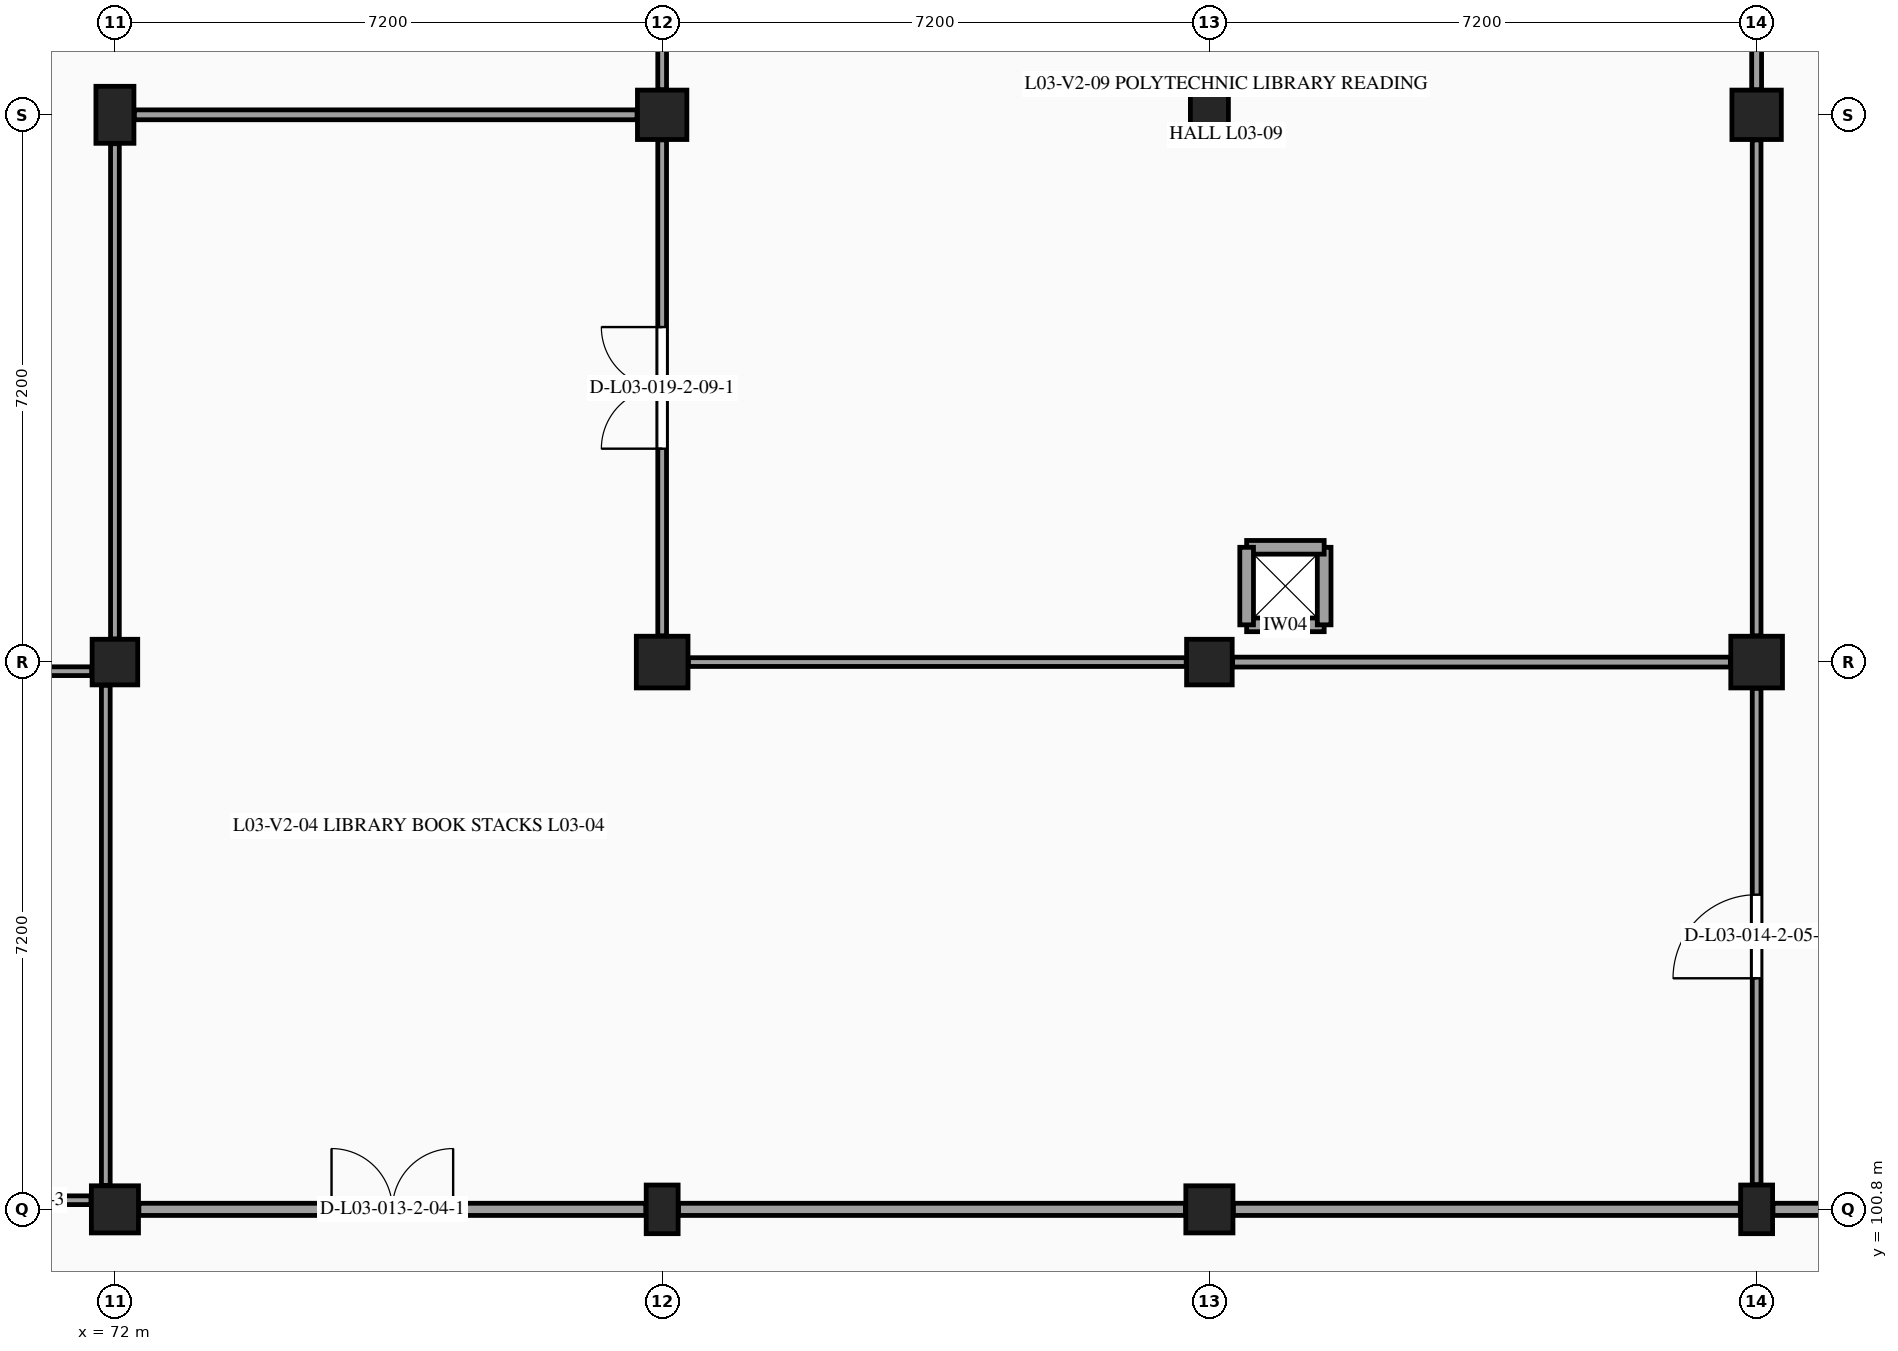
"""IFC4 building model, lengths in metres.
Left out: names, types, materials, properties, quantities, classifications, styles, units other than length and angle.
Written with IfcOpenShell. Run it as: python <this file> out.ifc"""

import sys

from ifc_helpers import new_model, si_unit, direction, frame, frame_2d, origin, origin_2d, place, context, subcontext, project, spatial, rectangle, extrude, element, fill, save


model = new_model("IFC4")
c1 = context("Model", 3, precision=1e-05, world=origin(), true_north=direction((0.0, 1.0)))
c2 = subcontext(c1, "Body", "Model", "MODEL_VIEW")
j1 = project(units=[si_unit("LENGTHUNIT", "METRE"), si_unit("PLANEANGLEUNIT", "RADIAN")], contexts=[c1])
p1 = place(None, origin())
s1 = spatial("IfcSite", under=j1, at=p1, CompositionType="ELEMENT")
p2 = place(p1, origin())
s2 = spatial("IfcBuilding", under=s1, at=p2, CompositionType="ELEMENT")
p3 = place(p2, frame((0.0, 0.0, 14.4)))
s3 = spatial("IfcBuildingStorey", under=s2, at=p3, CompositionType="ELEMENT", Elevation=14.4)
p4 = place(p3, frame((72.0, 100.8, 0.0), z_axis=(0.0, 0.0, 1.0), x_axis=(1.0, 0.0, 0.0)))
e1 = element("IfcColumn", 1, at=p4, inside=s3, PredefinedType="COLUMN", context=c2, shape_type="SweptSolid", body=[
    extrude(rectangle(XDim=0.62, YDim=0.62, at=origin_2d()), origin(), (0.0, 0.0, 1.0), 4.2),
])
p5 = place(p3, frame((72.0, 108.0, 0.0), z_axis=(0.0, 0.0, 1.0), x_axis=(1.0, 0.0, 0.0)))
e2 = element("IfcColumn", 2, at=p5, inside=s3, PredefinedType="COLUMN", context=c2, shape_type="SweptSolid", body=[
    extrude(rectangle(XDim=0.6, YDim=0.6, at=origin_2d()), origin(), (0.0, 0.0, 1.0), 4.2),
])
p6 = place(p3, frame((72.0, 115.2, 0.0), z_axis=(0.0, 0.0, 1.0), x_axis=(1.0, 0.0, 0.0)))
e3 = element("IfcColumn", 3, at=p6, inside=s3, PredefinedType="COLUMN", context=c2, shape_type="SweptSolid", body=[
    extrude(rectangle(XDim=0.5, YDim=0.75, at=origin_2d()), origin(), (0.0, 0.0, 1.0), 4.2),
])
p7 = place(p3, frame((79.2, 100.8, 0.0), z_axis=(0.0, 0.0, 1.0), x_axis=(1.0, 0.0, 0.0)))
e4 = element("IfcColumn", 4, at=p7, inside=s3, PredefinedType="PILASTER", context=c2, shape_type="SweptSolid", body=[
    extrude(rectangle(XDim=0.42, YDim=0.64, at=origin_2d()), origin(), (0.0, 0.0, 1.0), 4.2),
])
p8 = place(p3, frame((79.2, 108.0, 0.0), z_axis=(0.0, 0.0, 1.0), x_axis=(1.0, 0.0, 0.0)))
e5 = element("IfcColumn", 5, at=p8, inside=s3, PredefinedType="COLUMN", context=c2, shape_type="SweptSolid", body=[
    extrude(rectangle(XDim=0.68, YDim=0.68, at=origin_2d()), origin(), (0.0, 0.0, 1.0), 4.2),
])
p9 = place(p3, frame((79.2, 115.2, 0.0), z_axis=(0.0, 0.0, 1.0), x_axis=(1.0, 0.0, 0.0)))
e6 = element("IfcColumn", 6, at=p9, inside=s3, PredefinedType="COLUMN", context=c2, shape_type="SweptSolid", body=[
    extrude(rectangle(XDim=0.65, YDim=0.65, at=origin_2d()), origin(), (0.0, 0.0, 1.0), 4.2),
])
p10 = place(p3, frame((86.4, 100.8, 0.0), z_axis=(0.0, 0.0, 1.0), x_axis=(1.0, 0.0, 0.0)))
e7 = element("IfcColumn", 7, at=p10, inside=s3, PredefinedType="COLUMN", context=c2, shape_type="SweptSolid", body=[
    extrude(rectangle(XDim=0.62, YDim=0.62, at=origin_2d()), origin(), (0.0, 0.0, 1.0), 4.2),
])
p11 = place(p3, frame((86.4, 108.0, 0.0), z_axis=(0.0, 0.0, 1.0), x_axis=(1.0, 0.0, 0.0)))
e8 = element("IfcColumn", 8, at=p11, inside=s3, PredefinedType="COLUMN", context=c2, shape_type="SweptSolid", body=[
    extrude(rectangle(XDim=0.6, YDim=0.6, at=origin_2d()), origin(), (0.0, 0.0, 1.0), 4.2),
])
p12 = place(p3, frame((86.4, 115.2, 0.0), z_axis=(0.0, 0.0, 1.0), x_axis=(1.0, 0.0, 0.0)))
e9 = element("IfcColumn", 9, at=p12, inside=s3, PredefinedType="COLUMN", context=c2, shape_type="SweptSolid", body=[
    extrude(rectangle(XDim=0.5, YDim=0.75, at=origin_2d()), origin(), (0.0, 0.0, 1.0), 4.2),
])
p13 = place(p3, frame((93.6, 100.8, 0.0), z_axis=(0.0, 0.0, 1.0), x_axis=(1.0, 0.0, 0.0)))
e10 = element("IfcColumn", 10, at=p13, inside=s3, PredefinedType="PILASTER", context=c2, shape_type="SweptSolid", body=[
    extrude(rectangle(XDim=0.42, YDim=0.64, at=origin_2d()), origin(), (0.0, 0.0, 1.0), 4.2),
])
p14 = place(p3, frame((93.6, 108.0, 0.0), z_axis=(0.0, 0.0, 1.0), x_axis=(1.0, 0.0, 0.0)))
e11 = element("IfcColumn", 11, at=p14, inside=s3, PredefinedType="COLUMN", context=c2, shape_type="SweptSolid", body=[
    extrude(rectangle(XDim=0.68, YDim=0.68, at=origin_2d()), origin(), (0.0, 0.0, 1.0), 4.2),
])
p15 = place(p3, frame((93.6, 115.2, 0.0), z_axis=(0.0, 0.0, 1.0), x_axis=(1.0, 0.0, 0.0)))
e12 = element("IfcColumn", 12, at=p15, inside=s3, PredefinedType="COLUMN", context=c2, shape_type="SweptSolid", body=[
    extrude(rectangle(XDim=0.65, YDim=0.65, at=origin_2d()), origin(), (0.0, 0.0, 1.0), 4.2),
])
p16 = place(p3, frame((65.015, 100.92, 0.0), z_axis=(0.0, 0.0, 1.0), x_axis=(1.0, 0.0, 0.0)))
e13 = element("IfcWall", 13, at=p16, inside=s3, PredefinedType="PARTITIONING", context=c2, shape_type="SweptSolid", body=[
    extrude(rectangle(XDim=6.67, YDim=0.115, at=frame_2d((3.335, 0.0))), origin(), (0.0, 0.0, 1.0), 3.2),
])
p17 = place(p16, frame((0.785, 0.0, 0.0)))
e14 = element("IfcOpeningElement", 14, at=p17, cuts=e13, PredefinedType="OPENING", context=c2, shape_type="SweptSolid", body=[
    extrude(rectangle(XDim=0.95, YDim=2.1, at=frame_2d((0.475, 1.05))), frame((0.0, 0.067, 0.0), z_axis=(0.0, -1.0, 0.0), x_axis=(1.0, 0.0, 0.0)), (0.0, 0.0, 1.0), 0.135),
])
p18 = place(p16, frame((2.885, 0.0, 0.0)))
e15 = element("IfcOpeningElement", 15, at=p18, cuts=e13, PredefinedType="OPENING", context=c2, shape_type="SweptSolid", body=[
    extrude(rectangle(XDim=0.95, YDim=2.1, at=frame_2d((0.475, 1.05))), frame((0.0, 0.067, 0.0), z_axis=(0.0, -1.0, 0.0), x_axis=(1.0, 0.0, 0.0)), (0.0, 0.0, 1.0), 0.135),
])
p19 = place(p16, frame((5.035, 0.0, 0.0)))
e16 = element("IfcOpeningElement", 16, at=p19, cuts=e13, PredefinedType="OPENING", context=c2, shape_type="SweptSolid", body=[
    extrude(rectangle(XDim=1.0, YDim=2.15, at=frame_2d((0.5, 1.075))), frame((0.0, 0.067, 0.0), z_axis=(0.0, -1.0, 0.0), x_axis=(1.0, 0.0, 0.0)), (0.0, 0.0, 1.0), 0.135),
])
p20 = place(p3, frame((65.145, 107.88, 0.0), z_axis=(0.0, 0.0, 1.0), x_axis=(1.0, 0.0, 0.0)))
e17 = element("IfcWall", 17, at=p20, inside=s3, PredefinedType="PARTITIONING", context=c2, shape_type="SweptSolid", body=[
    extrude(rectangle(XDim=6.55, YDim=0.115, at=frame_2d((3.275, 0.0))), origin(), (0.0, 0.0, 1.0), 3.2),
])
p21 = place(p3, frame((71.88, 101.115, 0.0), z_axis=(0.0, 0.0, 1.0), x_axis=(0.0, 1.0, 0.0)))
e18 = element("IfcWall", 18, at=p21, inside=s3, PredefinedType="PARTITIONING", context=c2, shape_type="SweptSolid", body=[
    extrude(rectangle(XDim=6.58, YDim=0.115, at=frame_2d((3.29, 0.0))), origin(), (0.0, 0.0, 1.0), 3.25),
])
for number, where, z_axis, x_axis in (
    (19, (86.89, 108.49, 0.0), (0.0, 0.0, 1.0), (1.0, 0.0, 0.0)),
    (20, (87.91, 108.49, 0.0), (0.0, 0.0, 1.0), (0.0, 1.0, 0.0)),
    (21, (87.91, 109.51, 0.0), (0.0, 0.0, 1.0), (-1.0, 0.0, 0.0)),
    (22, (86.89, 109.51, 0.0), (0.0, 0.0, 1.0), (0.0, -1.0, 0.0)),
):
    element("IfcWall", number, at=place(p3, frame(where, z_axis=z_axis, x_axis=x_axis)), inside=s3, PredefinedType="PARTITIONING", context=c2, shape_type="SweptSolid", body=[
        extrude(rectangle(XDim=1.02, YDim=0.18, at=frame_2d((0.51, 0.0))), origin(), (0.0, 0.0, 1.0), 3.94),
    ])
p22 = place(p3, frame((72.0, 108.305, 0.0), z_axis=(0.0, 0.0, 1.0), x_axis=(0.0, 1.0, 0.0)))
e23 = element("IfcWall", 23, at=p22, inside=s3, PredefinedType="PARTITIONING", context=c2, shape_type="SweptSolid", body=[
    extrude(rectangle(XDim=6.515, YDim=0.115, at=frame_2d((3.258, 0.0))), origin(), (0.0, 0.0, 1.0), 3.245),
])
p23 = place(p3, frame((72.315, 100.8, 0.0), z_axis=(0.0, 0.0, 1.0), x_axis=(1.0, 0.0, 0.0)))
e24 = element("IfcWall", 24, at=p23, inside=s3, PredefinedType="PARTITIONING", context=c2, shape_type="SweptSolid", body=[
    extrude(rectangle(XDim=6.67, YDim=0.16, at=frame_2d((3.335, 0.0))), origin(), (0.0, 0.0, 1.0), 3.215),
])
p24 = place(p23, frame((2.535, 0.0, 0.0)))
e25 = element("IfcOpeningElement", 25, at=p24, cuts=e24, PredefinedType="OPENING", context=c2, shape_type="SweptSolid", body=[
    extrude(rectangle(XDim=1.6, YDim=2.2, at=frame_2d((0.8, 1.1))), frame((0.0, 0.09, 0.0), z_axis=(0.0, -1.0, 0.0), x_axis=(1.0, 0.0, 0.0)), (0.0, 0.0, 1.0), 0.18),
])
p25 = place(p3, frame((79.2, 108.345, 0.0), z_axis=(0.0, 0.0, 1.0), x_axis=(0.0, 1.0, 0.0)))
e26 = element("IfcWall", 26, at=p25, inside=s3, PredefinedType="PARTITIONING", context=c2, shape_type="SweptSolid", body=[
    extrude(rectangle(XDim=6.525, YDim=0.115, at=frame_2d((3.263, 0.0))), origin(), (0.0, 0.0, 1.0), 3.245),
])
p26 = place(p25, frame((2.462, 0.0, 0.0)))
e27 = element("IfcOpeningElement", 27, at=p26, cuts=e26, PredefinedType="OPENING", context=c2, shape_type="SweptSolid", body=[
    extrude(rectangle(XDim=1.6, YDim=2.2, at=frame_2d((0.8, 1.1))), frame((0.0, 0.067, 0.0), z_axis=(0.0, -1.0, 0.0), x_axis=(1.0, 0.0, 0.0)), (0.0, 0.0, 1.0), 0.135),
])
p27 = place(p3, frame((72.255, 115.2, 0.0), z_axis=(0.0, 0.0, 1.0), x_axis=(1.0, 0.0, 0.0)))
e28 = element("IfcWall", 28, at=p27, inside=s3, PredefinedType="PARTITIONING", context=c2, shape_type="SweptSolid", body=[
    extrude(rectangle(XDim=6.615, YDim=0.13, at=frame_2d((3.308, 0.0))), origin(), (0.0, 0.0, 1.0), 3.215),
])
p28 = place(p3, frame((79.2, 115.53, 0.0), z_axis=(0.0, 0.0, 1.0), x_axis=(0.0, 1.0, 0.0)))
e29 = element("IfcWall", 29, at=p28, inside=s3, PredefinedType="PARTITIONING", context=c2, shape_type="SweptSolid", body=[
    extrude(rectangle(XDim=6.555, YDim=0.115, at=frame_2d((3.277, 0.0))), origin(), (0.0, 0.0, 1.0), 3.245),
])
p29 = place(p3, frame((79.415, 100.8, 0.0), z_axis=(0.0, 0.0, 1.0), x_axis=(1.0, 0.0, 0.0)))
e30 = element("IfcWall", 30, at=p29, inside=s3, PredefinedType="PARTITIONING", context=c2, shape_type="SweptSolid", body=[
    extrude(rectangle(XDim=6.67, YDim=0.16, at=frame_2d((3.335, 0.0))), origin(), (0.0, 0.0, 1.0), 3.22),
])
p30 = place(p3, frame((79.545, 108.0, 0.0), z_axis=(0.0, 0.0, 1.0), x_axis=(1.0, 0.0, 0.0)))
e31 = element("IfcWall", 31, at=p30, inside=s3, PredefinedType="PARTITIONING", context=c2, shape_type="SweptSolid", body=[
    extrude(rectangle(XDim=6.55, YDim=0.115, at=frame_2d((3.275, 0.0))), origin(), (0.0, 0.0, 1.0), 3.22),
])
p31 = place(p3, frame((86.715, 100.8, 0.0), z_axis=(0.0, 0.0, 1.0), x_axis=(1.0, 0.0, 0.0)))
e32 = element("IfcWall", 32, at=p31, inside=s3, PredefinedType="PARTITIONING", context=c2, shape_type="SweptSolid", body=[
    extrude(rectangle(XDim=6.67, YDim=0.16, at=frame_2d((3.335, 0.0))), origin(), (0.0, 0.0, 1.0), 3.24),
])
p32 = place(p3, frame((93.6, 101.125, 0.0), z_axis=(0.0, 0.0, 1.0), x_axis=(0.0, 1.0, 0.0)))
e33 = element("IfcWall", 33, at=p32, inside=s3, PredefinedType="PARTITIONING", context=c2, shape_type="SweptSolid", body=[
    extrude(rectangle(XDim=6.53, YDim=0.115, at=frame_2d((3.265, 0.0))), origin(), (0.0, 0.0, 1.0), 3.225),
])
p33 = place(p32, frame((2.715, 0.0, 0.0)))
e34 = element("IfcOpeningElement", 34, at=p33, cuts=e33, PredefinedType="OPENING", context=c2, shape_type="SweptSolid", body=[
    extrude(rectangle(XDim=1.1, YDim=2.15, at=frame_2d((0.55, 1.075))), frame((0.0, 0.067, 0.0), z_axis=(0.0, -1.0, 0.0), x_axis=(1.0, 0.0, 0.0)), (0.0, 0.0, 1.0), 0.135),
])
p34 = place(p3, frame((86.705, 108.0, 0.0), z_axis=(0.0, 0.0, 1.0), x_axis=(1.0, 0.0, 0.0)))
e35 = element("IfcWall", 35, at=p34, inside=s3, PredefinedType="PARTITIONING", context=c2, shape_type="SweptSolid", body=[
    extrude(rectangle(XDim=6.55, YDim=0.13, at=frame_2d((3.275, 0.0))), origin(), (0.0, 0.0, 1.0), 3.24),
])
p35 = place(p3, frame((93.6, 108.345, 0.0), z_axis=(0.0, 0.0, 1.0), x_axis=(0.0, 1.0, 0.0)))
e36 = element("IfcWall", 36, at=p35, inside=s3, PredefinedType="PARTITIONING", context=c2, shape_type="SweptSolid", body=[
    extrude(rectangle(XDim=6.525, YDim=0.115, at=frame_2d((3.263, 0.0))), origin(), (0.0, 0.0, 1.0), 3.22),
])
p36 = place(p3, frame((93.6, 115.53, 0.0), z_axis=(0.0, 0.0, 1.0), x_axis=(0.0, 1.0, 0.0)))
e37 = element("IfcWall", 37, at=p36, inside=s3, PredefinedType="PARTITIONING", context=c2, shape_type="SweptSolid", body=[
    extrude(rectangle(XDim=6.555, YDim=0.13, at=frame_2d((3.277, 0.0))), origin(), (0.0, 0.0, 1.0), 3.22),
])
p37 = place(p3, frame((93.815, 100.8, 0.0), z_axis=(0.0, 0.0, 1.0), x_axis=(1.0, 0.0, 0.0)))
e38 = element("IfcWall", 38, at=p37, inside=s3, PredefinedType="PARTITIONING", context=c2, shape_type="SweptSolid", body=[
    extrude(rectangle(XDim=6.67, YDim=0.16, at=frame_2d((3.335, 0.0))), origin(), (0.0, 0.0, 1.0), 3.255),
])
p38 = place(p37, frame((2.375, 0.0, 0.0)))
e39 = element("IfcOpeningElement", 39, at=p38, cuts=e38, PredefinedType="OPENING", context=c2, shape_type="SweptSolid", body=[
    extrude(rectangle(XDim=1.92, YDim=2.35, at=frame_2d((0.96, 1.175))), frame((0.0, 0.09, 0.0), z_axis=(0.0, -1.0, 0.0), x_axis=(1.0, 0.0, 0.0)), (0.0, 0.0, 1.0), 0.18),
])
p39 = place(p24, origin())
e40 = element("IfcDoor", 40, at=p39, inside=s3, OperationType="DOUBLE_DOOR_SINGLE_SWING", PredefinedType="DOOR", context=c2, shape_type="SweptSolid", body=[
    extrude(rectangle(XDim=1.6, YDim=2.2, at=frame_2d((0.8, 1.1))), frame((0.0, 0.025, 0.0), z_axis=(0.0, -1.0, 0.0), x_axis=(1.0, 0.0, 0.0)), (0.0, 0.0, 1.0), 0.05),
])
fill(e25, e40)
p40 = place(p33, origin())
e41 = element("IfcDoor", 41, at=p40, inside=s3, OperationType="SINGLE_SWING_LEFT", PredefinedType="DOOR", context=c2, shape_type="SweptSolid", body=[
    extrude(rectangle(XDim=1.1, YDim=2.15, at=frame_2d((0.55, 1.075))), frame((0.0, 0.025, 0.0), z_axis=(0.0, -1.0, 0.0), x_axis=(1.0, 0.0, 0.0)), (0.0, 0.0, 1.0), 0.05),
])
fill(e34, e41)
p41 = place(p26, origin())
e42 = element("IfcDoor", 42, at=p41, inside=s3, OperationType="DOUBLE_DOOR_SINGLE_SWING", PredefinedType="DOOR", context=c2, shape_type="SweptSolid", body=[
    extrude(rectangle(XDim=1.6, YDim=2.2, at=frame_2d((0.8, 1.1))), frame((0.0, 0.025, 0.0), z_axis=(0.0, -1.0, 0.0), x_axis=(1.0, 0.0, 0.0)), (0.0, 0.0, 1.0), 0.05),
])
fill(e27, e42)
save(model, sys.argv[1])
